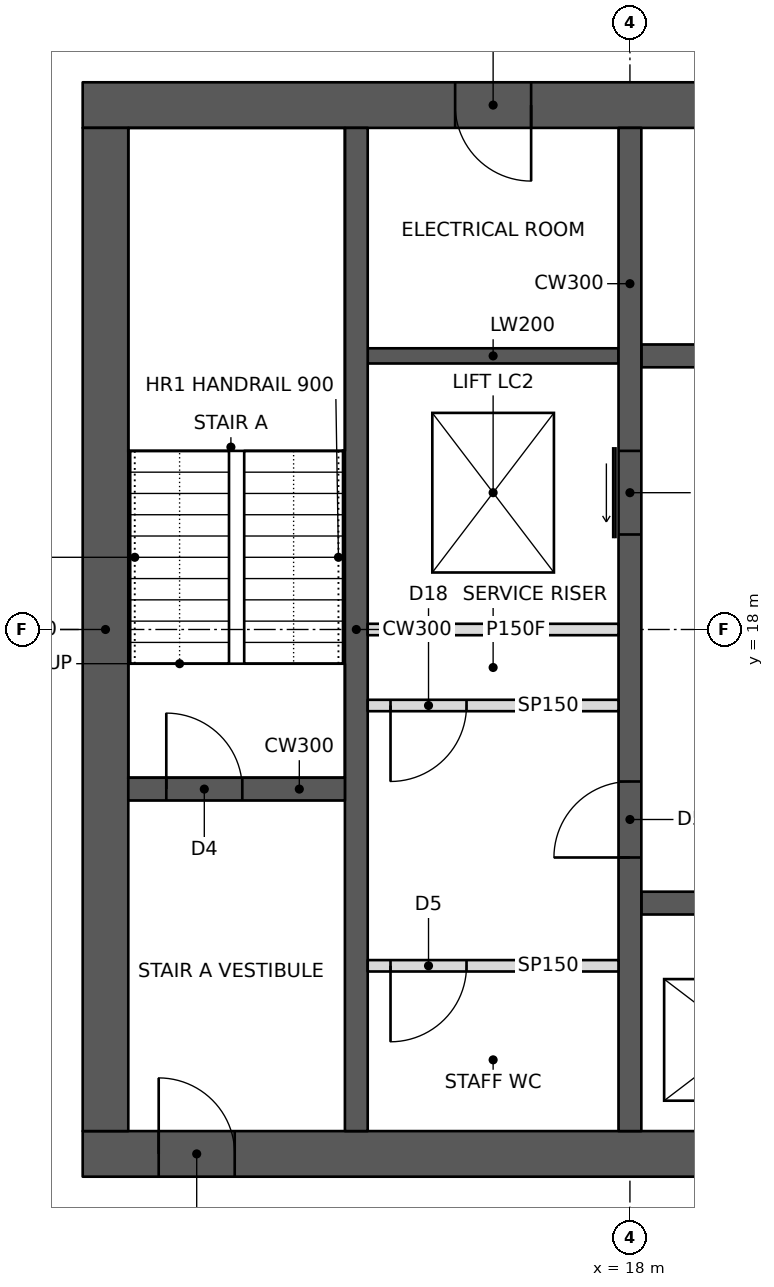
"""IFC4 building model, lengths in metres.
Left out: names, types, materials, properties, quantities, classifications, styles, units other than length and angle.
Written with IfcOpenShell. Run it as: python <this file> out.ifc"""

import sys

from ifc_helpers import new_model, si_unit, direction, frame, frame_2d, origin, place, context, subcontext, project, spatial, rectangle, extrude, element, fill, save


model = new_model("IFC4")
c1 = context("Model", 3, precision=1e-05, world=origin(), true_north=direction((0.0, 1.0)))
c2 = subcontext(c1, "Body", "Model", "MODEL_VIEW")
j1 = project(units=[si_unit("LENGTHUNIT", "METRE"), si_unit("PLANEANGLEUNIT", "RADIAN")], contexts=[c1])
p1 = place(None, origin())
s1 = spatial("IfcSite", under=j1, at=p1, CompositionType="ELEMENT")
p2 = place(p1, origin())
s2 = spatial("IfcBuilding", under=s1, at=p2, CompositionType="ELEMENT")
p3 = place(p2, frame((0.0, 0.0, 262.6)))
s3 = spatial("IfcBuildingStorey", under=s2, at=p3, CompositionType="ELEMENT", Elevation=262.6)
p4 = place(p3, frame((10.8, 11.1, 0.0), z_axis=(0.0, 0.0, 1.0), x_axis=(1.0, 0.0, 0.0)))
e1 = element("IfcWall", 1, at=p4, inside=s3, PredefinedType="SHEAR", context=c2, shape_type="SweptSolid", body=[
    extrude(rectangle(XDim=23.4, YDim=0.6, at=frame_2d((11.7, 0.0))), origin(), (0.0, 0.0, 1.0), 3.6),
])
p5 = place(p4, frame((1.0, 0.0, 0.0)))
e2 = element("IfcOpeningElement", 2, at=p5, cuts=e1, PredefinedType="OPENING", context=c2, shape_type="SweptSolid", body=[
    extrude(rectangle(XDim=1.0, YDim=2.1, at=frame_2d((0.5, 1.05))), frame((0.0, 0.31, 0.0), z_axis=(0.0, -1.0, 0.0), x_axis=(1.0, 0.0, 0.0)), (0.0, 0.0, 1.0), 0.62),
])
p6 = place(p4, frame((17.2, 0.0, 0.0)))
e3 = element("IfcOpeningElement", 3, at=p6, cuts=e1, PredefinedType="OPENING", context=c2, shape_type="SweptSolid", body=[
    extrude(rectangle(XDim=1.8, YDim=2.1, at=frame_2d((0.9, 1.05))), frame((0.0, 0.31, 0.0), z_axis=(0.0, -1.0, 0.0), x_axis=(1.0, 0.0, 0.0)), (0.0, 0.0, 1.0), 0.62),
])
p7 = place(p3, frame((10.8, 24.9, 0.0), z_axis=(0.0, 0.0, 1.0), x_axis=(1.0, 0.0, 0.0)))
e4 = element("IfcWall", 4, at=p7, inside=s3, PredefinedType="SHEAR", context=c2, shape_type="SweptSolid", body=[
    extrude(rectangle(XDim=23.4, YDim=0.6, at=frame_2d((11.7, 0.0))), origin(), (0.0, 0.0, 1.0), 3.6),
])
p8 = place(p7, frame((17.2, 0.0, 0.0)))
e5 = element("IfcOpeningElement", 5, at=p8, cuts=e4, PredefinedType="OPENING", context=c2, shape_type="SweptSolid", body=[
    extrude(rectangle(XDim=1.8, YDim=2.1, at=frame_2d((0.9, 1.05))), frame((0.0, 0.31, 0.0), z_axis=(0.0, -1.0, 0.0), x_axis=(1.0, 0.0, 0.0)), (0.0, 0.0, 1.0), 0.62),
])
p9 = place(p7, frame((21.1, 0.0, 0.0)))
e6 = element("IfcOpeningElement", 6, at=p9, cuts=e4, PredefinedType="OPENING", context=c2, shape_type="SweptSolid", body=[
    extrude(rectangle(XDim=1.0, YDim=2.1, at=frame_2d((0.5, 1.05))), frame((0.0, 0.31, 0.0), z_axis=(0.0, -1.0, 0.0), x_axis=(1.0, 0.0, 0.0)), (0.0, 0.0, 1.0), 0.62),
])
p10 = place(p7, frame((4.9, 0.0, 0.0)))
e7 = element("IfcOpeningElement", 7, at=p10, cuts=e4, PredefinedType="OPENING", context=c2, shape_type="SweptSolid", body=[
    extrude(rectangle(XDim=1.0, YDim=2.1, at=frame_2d((0.5, 1.05))), frame((0.0, 0.31, 0.0), z_axis=(0.0, -1.0, 0.0), x_axis=(1.0, 0.0, 0.0)), (0.0, 0.0, 1.0), 0.62),
])
p11 = place(p3, frame((11.1, 11.4, 0.0), z_axis=(0.0, 0.0, 1.0), x_axis=(0.0, 1.0, 0.0)))
e8 = element("IfcWall", 8, at=p11, inside=s3, PredefinedType="SHEAR", context=c2, shape_type="SweptSolid", body=[
    extrude(rectangle(XDim=13.2, YDim=0.6, at=frame_2d((6.6, 0.0))), origin(), (0.0, 0.0, 1.0), 3.6),
])
p12 = place(p3, frame((14.4, 11.4, 0.0), z_axis=(0.0, 0.0, 1.0), x_axis=(0.0, 1.0, 0.0)))
e9 = element("IfcWall", 9, at=p12, inside=s3, PredefinedType="SHEAR", context=c2, shape_type="SweptSolid", body=[
    extrude(rectangle(XDim=13.2, YDim=0.3, at=frame_2d((6.6, 0.0))), origin(), (0.0, 0.0, 1.0), 3.6),
])
p13 = place(p3, frame((11.4, 15.9, 0.0), z_axis=(0.0, 0.0, 1.0), x_axis=(1.0, 0.0, 0.0)))
e10 = element("IfcWall", 10, at=p13, inside=s3, PredefinedType="SHEAR", context=c2, shape_type="SweptSolid", body=[
    extrude(rectangle(XDim=2.85, YDim=0.3, at=frame_2d((1.425, 0.0))), origin(), (0.0, 0.0, 1.0), 3.6),
])
p14 = place(p13, frame((0.5, 0.0, 0.0)))
e11 = element("IfcOpeningElement", 11, at=p14, cuts=e10, PredefinedType="OPENING", context=c2, shape_type="SweptSolid", body=[
    extrude(rectangle(XDim=1.0, YDim=2.1, at=frame_2d((0.5, 1.05))), frame((0.0, 0.16, 0.0), z_axis=(0.0, -1.0, 0.0), x_axis=(1.0, 0.0, 0.0)), (0.0, 0.0, 1.0), 0.32),
])
p15 = place(p3, frame((18.0, 11.4, 0.0), z_axis=(0.0, 0.0, 1.0), x_axis=(0.0, 1.0, 0.0)))
e12 = element("IfcWall", 12, at=p15, inside=s3, PredefinedType="SHEAR", context=c2, shape_type="SweptSolid", body=[
    extrude(rectangle(XDim=13.2, YDim=0.3, at=frame_2d((6.6, 0.0))), origin(), (0.0, 0.0, 1.0), 3.6),
])
p16 = place(p15, frame((3.6, 0.0, 0.0)))
e13 = element("IfcOpeningElement", 13, at=p16, cuts=e12, PredefinedType="OPENING", context=c2, shape_type="SweptSolid", body=[
    extrude(rectangle(XDim=1.0, YDim=2.1, at=frame_2d((0.5, 1.05))), frame((0.0, 0.16, 0.0), z_axis=(0.0, -1.0, 0.0), x_axis=(1.0, 0.0, 0.0)), (0.0, 0.0, 1.0), 0.32),
])
p17 = place(p15, frame((7.85, 0.0, 0.0)))
e14 = element("IfcOpeningElement", 14, at=p17, cuts=e12, PredefinedType="OPENING", context=c2, shape_type="SweptSolid", body=[
    extrude(rectangle(XDim=1.1, YDim=2.1, at=frame_2d((0.55, 1.05))), frame((0.0, 0.16, 0.0), z_axis=(0.0, -1.0, 0.0), x_axis=(1.0, 0.0, 0.0)), (0.0, 0.0, 1.0), 0.32),
])
p18 = place(p3, frame((14.55, 18.0, 0.0), z_axis=(0.0, 0.0, 1.0), x_axis=(1.0, 0.0, 0.0)))
e15 = element("IfcWall", 15, at=p18, inside=s3, PredefinedType="PARTITIONING", context=c2, shape_type="SweptSolid", body=[
    extrude(rectangle(XDim=3.3, YDim=0.15, at=frame_2d((1.65, 0.0))), origin(), (0.0, 0.0, 1.0), 3.4),
])
p19 = place(p3, frame((18.15, 14.4, 0.0), z_axis=(0.0, 0.0, 1.0), x_axis=(1.0, 0.0, 0.0)))
e16 = element("IfcWall", 16, at=p19, inside=s3, PredefinedType="SHEAR", context=c2, shape_type="SweptSolid", body=[
    extrude(rectangle(XDim=9.0, YDim=0.3, at=frame_2d((4.5, 0.0))), origin(), (0.0, 0.0, 1.0), 3.6),
])
p20 = place(p19, frame((0.8, 0.0, 0.0)))
e17 = element("IfcOpeningElement", 17, at=p20, cuts=e16, PredefinedType="OPENING", context=c2, shape_type="SweptSolid", body=[
    extrude(rectangle(XDim=1.1, YDim=2.1, at=frame_2d((0.55, 1.05))), frame((0.0, 0.16, 0.0), z_axis=(0.0, -1.0, 0.0), x_axis=(1.0, 0.0, 0.0)), (0.0, 0.0, 1.0), 0.32),
])
p21 = place(p19, frame((6.75, 0.0, 0.0)))
e18 = element("IfcOpeningElement", 18, at=p21, cuts=e16, PredefinedType="OPENING", context=c2, shape_type="SweptSolid", body=[
    extrude(rectangle(XDim=1.2, YDim=2.1, at=frame_2d((0.6, 1.05))), frame((0.0, 0.16, 0.0), z_axis=(0.0, -1.0, 0.0), x_axis=(1.0, 0.0, 0.0)), (0.0, 0.0, 1.0), 0.32),
])
p22 = place(p19, frame((3.8, 0.0, 0.0)))
e19 = element("IfcOpeningElement", 19, at=p22, cuts=e16, PredefinedType="OPENING", context=c2, shape_type="SweptSolid", body=[
    extrude(rectangle(XDim=1.1, YDim=2.1, at=frame_2d((0.55, 1.05))), frame((0.0, 0.16, 0.0), z_axis=(0.0, -1.0, 0.0), x_axis=(1.0, 0.0, 0.0)), (0.0, 0.0, 1.0), 0.32),
])
p23 = place(p3, frame((18.15, 21.6, 0.0), z_axis=(0.0, 0.0, 1.0), x_axis=(1.0, 0.0, 0.0)))
e20 = element("IfcWall", 20, at=p23, inside=s3, PredefinedType="SHEAR", context=c2, shape_type="SweptSolid", body=[
    extrude(rectangle(XDim=9.0, YDim=0.3, at=frame_2d((4.5, 0.0))), origin(), (0.0, 0.0, 1.0), 3.6),
])
p24 = place(p23, frame((6.75, 0.0, 0.0)))
e21 = element("IfcOpeningElement", 21, at=p24, cuts=e20, PredefinedType="OPENING", context=c2, shape_type="SweptSolid", body=[
    extrude(rectangle(XDim=1.2, YDim=2.1, at=frame_2d((0.6, 1.05))), frame((0.0, 0.16, 0.0), z_axis=(0.0, -1.0, 0.0), x_axis=(1.0, 0.0, 0.0)), (0.0, 0.0, 1.0), 0.32),
])
p25 = place(p23, frame((0.8, 0.0, 0.0)))
e22 = element("IfcOpeningElement", 22, at=p25, cuts=e20, PredefinedType="OPENING", context=c2, shape_type="SweptSolid", body=[
    extrude(rectangle(XDim=1.1, YDim=2.1, at=frame_2d((0.55, 1.05))), frame((0.0, 0.16, 0.0), z_axis=(0.0, -1.0, 0.0), x_axis=(1.0, 0.0, 0.0)), (0.0, 0.0, 1.0), 0.32),
])
p26 = place(p23, frame((3.8, 0.0, 0.0)))
e23 = element("IfcOpeningElement", 23, at=p26, cuts=e20, PredefinedType="OPENING", context=c2, shape_type="SweptSolid", body=[
    extrude(rectangle(XDim=1.1, YDim=2.1, at=frame_2d((0.55, 1.05))), frame((0.0, 0.16, 0.0), z_axis=(0.0, -1.0, 0.0), x_axis=(1.0, 0.0, 0.0)), (0.0, 0.0, 1.0), 0.32),
])
p27 = place(p3, frame((14.55, 21.6, 0.0), z_axis=(0.0, 0.0, 1.0), x_axis=(1.0, 0.0, 0.0)))
e24 = element("IfcWall", 24, at=p27, inside=s3, PredefinedType="SHEAR", context=c2, shape_type="SweptSolid", body=[
    extrude(rectangle(XDim=3.3, YDim=0.2, at=frame_2d((1.65, 0.0))), origin(), (0.0, 0.0, 1.0), 3.6),
])
p28 = place(p3, frame((14.55, 17.0, 0.0), z_axis=(0.0, 0.0, 1.0), x_axis=(1.0, 0.0, 0.0)))
e25 = element("IfcWall", 25, at=p28, inside=s3, PredefinedType="PARTITIONING", context=c2, shape_type="SweptSolid", body=[
    extrude(rectangle(XDim=3.3, YDim=0.15, at=frame_2d((1.65, 0.0))), origin(), (0.0, 0.0, 1.0), 3.4),
])
p29 = place(p28, frame((0.3, 0.0, 0.0)))
e26 = element("IfcOpeningElement", 26, at=p29, cuts=e25, PredefinedType="OPENING", context=c2, shape_type="SweptSolid", body=[
    extrude(rectangle(XDim=1.0, YDim=2.1, at=frame_2d((0.5, 1.05))), frame((0.0, 0.085, 0.0), z_axis=(0.0, -1.0, 0.0), x_axis=(1.0, 0.0, 0.0)), (0.0, 0.0, 1.0), 0.17),
])
p30 = place(p3, frame((14.55, 13.575, 0.0), z_axis=(0.0, 0.0, 1.0), x_axis=(1.0, 0.0, 0.0)))
e27 = element("IfcWall", 27, at=p30, inside=s3, PredefinedType="PARTITIONING", context=c2, shape_type="SweptSolid", body=[
    extrude(rectangle(XDim=3.3, YDim=0.15, at=frame_2d((1.65, 0.0))), origin(), (0.0, 0.0, 1.0), 3.4),
])
p31 = place(p30, frame((0.3, 0.0, 0.0)))
e28 = element("IfcOpeningElement", 28, at=p31, cuts=e27, PredefinedType="OPENING", context=c2, shape_type="SweptSolid", body=[
    extrude(rectangle(XDim=1.0, YDim=2.1, at=frame_2d((0.5, 1.05))), frame((0.0, 0.085, 0.0), z_axis=(0.0, -1.0, 0.0), x_axis=(1.0, 0.0, 0.0)), (0.0, 0.0, 1.0), 0.17),
])
p32 = place(p29, frame((1.0, 0.0, 0.0), z_axis=(0.0, 0.0, 1.0), x_axis=(-1.0, 0.0, 0.0)))
e29 = element("IfcDoor", 29, at=p32, inside=s3, OperationType="SINGLE_SWING_RIGHT", PredefinedType="DOOR", context=c2, shape_type="SweptSolid", body=[
    extrude(rectangle(XDim=1.0, YDim=2.1, at=frame_2d((0.5, 1.05))), frame((0.0, 0.025, 0.0), z_axis=(0.0, -1.0, 0.0), x_axis=(1.0, 0.0, 0.0)), (0.0, 0.0, 1.0), 0.05),
])
fill(e26, e29)
p33 = place(p31, frame((1.0, 0.0, 0.0), z_axis=(0.0, 0.0, 1.0), x_axis=(-1.0, 0.0, 0.0)))
e30 = element("IfcDoor", 30, at=p33, inside=s3, OperationType="SINGLE_SWING_RIGHT", PredefinedType="DOOR", context=c2, shape_type="SweptSolid", body=[
    extrude(rectangle(XDim=1.0, YDim=2.1, at=frame_2d((0.5, 1.05))), frame((0.0, 0.025, 0.0), z_axis=(0.0, -1.0, 0.0), x_axis=(1.0, 0.0, 0.0)), (0.0, 0.0, 1.0), 0.05),
])
fill(e28, e30)
p34 = place(p5, origin())
e31 = element("IfcDoor", 31, at=p34, inside=s3, OperationType="SINGLE_SWING_LEFT", PredefinedType="DOOR", context=c2, shape_type="SweptSolid", body=[
    extrude(rectangle(XDim=1.0, YDim=2.1, at=frame_2d((0.5, 1.05))), frame((0.0, 0.025, 0.0), z_axis=(0.0, -1.0, 0.0), x_axis=(1.0, 0.0, 0.0)), (0.0, 0.0, 1.0), 0.05),
])
fill(e2, e31)
p35 = place(p14, origin())
e32 = element("IfcDoor", 32, at=p35, inside=s3, OperationType="SINGLE_SWING_LEFT", PredefinedType="DOOR", context=c2, shape_type="SweptSolid", body=[
    extrude(rectangle(XDim=1.0, YDim=2.1, at=frame_2d((0.5, 1.05))), frame((0.0, 0.025, 0.0), z_axis=(0.0, -1.0, 0.0), x_axis=(1.0, 0.0, 0.0)), (0.0, 0.0, 1.0), 0.05),
])
fill(e11, e32)
p36 = place(p16, origin())
e33 = element("IfcDoor", 33, at=p36, inside=s3, OperationType="SINGLE_SWING_LEFT", PredefinedType="DOOR", context=c2, shape_type="SweptSolid", body=[
    extrude(rectangle(XDim=1.0, YDim=2.1, at=frame_2d((0.5, 1.05))), frame((0.0, 0.025, 0.0), z_axis=(0.0, -1.0, 0.0), x_axis=(1.0, 0.0, 0.0)), (0.0, 0.0, 1.0), 0.05),
])
fill(e13, e33)
p37 = place(p10, frame((1.0, 0.0, 0.0), z_axis=(0.0, 0.0, 1.0), x_axis=(-1.0, 0.0, 0.0)))
e34 = element("IfcDoor", 34, at=p37, inside=s3, OperationType="SINGLE_SWING_LEFT", PredefinedType="DOOR", context=c2, shape_type="SweptSolid", body=[
    extrude(rectangle(XDim=1.0, YDim=2.1, at=frame_2d((0.5, 1.05))), frame((0.0, 0.025, 0.0), z_axis=(0.0, -1.0, 0.0), x_axis=(1.0, 0.0, 0.0)), (0.0, 0.0, 1.0), 0.05),
])
fill(e7, e34)
p38 = place(p17, origin())
e35 = element("IfcDoor", 35, at=p38, inside=s3, OperationType="SLIDING_TO_LEFT", PredefinedType="DOOR", context=c2, shape_type="SweptSolid", body=[
    extrude(rectangle(XDim=1.1, YDim=2.1, at=frame_2d((0.55, 1.05))), frame((0.0, 0.025, 0.0), z_axis=(0.0, -1.0, 0.0), x_axis=(1.0, 0.0, 0.0)), (0.0, 0.0, 1.0), 0.05),
])
fill(e14, e35)
save(model, sys.argv[1])
